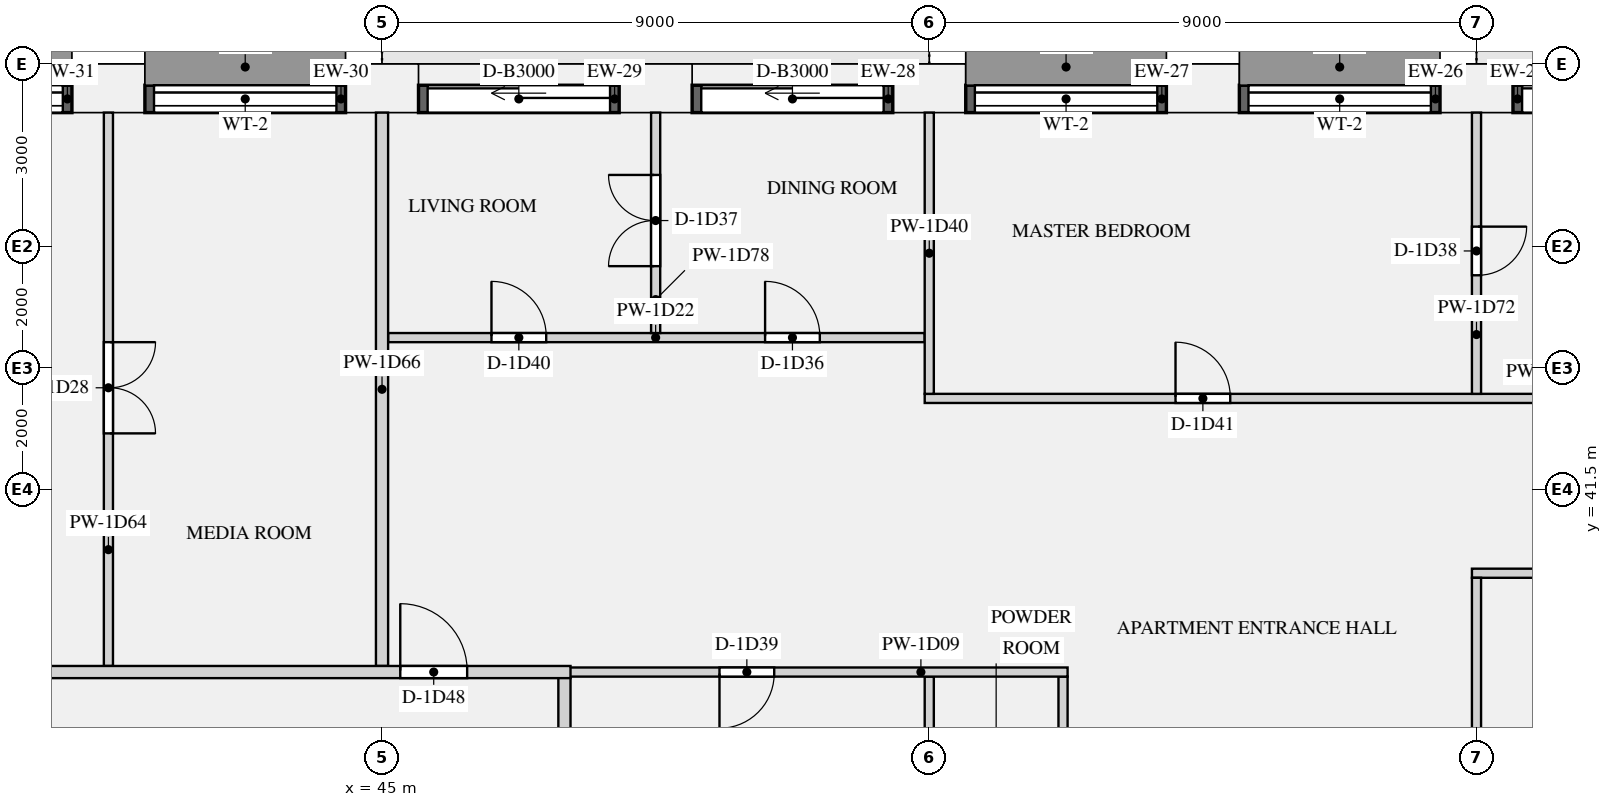
"""IFC4 building model, lengths in metres.
Left out: names, types, materials, properties, quantities, classifications, styles, units other than length and angle.
Written with IfcOpenShell. Run it as: python <this file> out.ifc"""

import sys

from ifc_helpers import new_model, si_unit, direction, frame, frame_2d, origin, origin_2d, place, context, subcontext, project, spatial, rectangle, extrude, element, fill, save


model = new_model("IFC4")
c1 = context("Model", 3, precision=1e-05, world=origin(), true_north=direction((0.0, 1.0)))
c2 = subcontext(c1, "Body", "Model", "MODEL_VIEW")
j1 = project(units=[si_unit("LENGTHUNIT", "METRE"), si_unit("PLANEANGLEUNIT", "RADIAN")], contexts=[c1])
p1 = place(None, origin())
s1 = spatial("IfcSite", under=j1, at=p1, CompositionType="ELEMENT")
p2 = place(p1, origin())
s2 = spatial("IfcBuilding", under=s1, at=p2, CompositionType="ELEMENT")
p3 = place(p2, frame((0.0, 0.0, 47.85)))
s3 = spatial("IfcBuildingStorey", under=s2, at=p3, CompositionType="ELEMENT", Elevation=47.85)
for number, where, z_axis, x_axis in (
    (1, (63.0, 48.1, 0.0), (0.0, 0.0, 1.0), (-1.0, 0.0, 0.0)),
    (2, (58.5, 48.1, 0.0), (0.0, 0.0, 1.0), (-1.0, 0.0, 0.0)),
    (3, (54.0, 48.1, 0.0), (0.0, 0.0, 1.0), (-1.0, 0.0, 0.0)),
    (4, (49.5, 48.1, 0.0), (0.0, 0.0, 1.0), (-1.0, 0.0, 0.0)),
    (5, (45.0, 48.1, 0.0), (0.0, 0.0, 1.0), (-1.0, 0.0, 0.0)),
    (6, (40.5, 48.1, 0.0), (0.0, 0.0, 1.0), (-1.0, 0.0, 0.0)),
):
    element("IfcColumn", number, at=place(p3, frame(where, z_axis=z_axis, x_axis=x_axis)), inside=s3, PredefinedType="USERDEFINED", context=c2, shape_type="SweptSolid", body=[
        extrude(rectangle(XDim=1.2, YDim=0.8, at=origin_2d()), origin(), (0.0, 0.0, 1.0), 3.15),
    ])
p4 = place(p3, frame((66.9, 47.925, 0.0), z_axis=(0.0, 0.0, 1.0), x_axis=(-1.0, 0.0, 0.0)))
e7 = element("IfcWall", 7, at=p4, inside=s3, PredefinedType="SOLIDWALL", context=c2, shape_type="SweptSolid", body=[
    extrude(rectangle(XDim=3.3, YDim=0.45, at=frame_2d((1.65, 0.0))), origin(), (0.0, 0.0, 1.0), 2.83),
])
p5 = place(p4, frame((0.15, 0.0, 0.0)))
e8 = element("IfcOpeningElement", 8, at=p5, cuts=e7, PredefinedType="OPENING", context=c2, shape_type="SweptSolid", body=[
    extrude(rectangle(XDim=3.0, YDim=2.3, at=frame_2d((1.5, 1.15))), frame((0.0, 0.235, 0.0), z_axis=(0.0, -1.0, 0.0), x_axis=(1.0, 0.0, 0.0)), (0.0, 0.0, 1.0), 0.47),
])
p6 = place(p3, frame((62.4, 47.925, 0.9), z_axis=(0.0, 0.0, 1.0), x_axis=(-1.0, 0.0, 0.0)))
e9 = element("IfcWall", 9, at=p6, inside=s3, PredefinedType="SOLIDWALL", context=c2, shape_type="SweptSolid", body=[
    extrude(rectangle(XDim=3.3, YDim=0.45, at=frame_2d((1.65, 0.0))), origin(), (0.0, 0.0, 1.0), 1.93),
])
p7 = place(p6, frame((0.15, 0.0, 0.15)))
e10 = element("IfcOpeningElement", 10, at=p7, cuts=e9, PredefinedType="OPENING", context=c2, shape_type="SweptSolid", body=[
    extrude(rectangle(XDim=3.0, YDim=1.5, at=frame_2d((1.5, 0.75))), frame((0.0, 0.235, 0.0), z_axis=(0.0, -1.0, 0.0), x_axis=(1.0, 0.0, 0.0)), (0.0, 0.0, 1.0), 0.47),
])
p8 = place(p3, frame((57.9, 47.925, 0.9), z_axis=(0.0, 0.0, 1.0), x_axis=(-1.0, 0.0, 0.0)))
e11 = element("IfcWall", 11, at=p8, inside=s3, PredefinedType="SOLIDWALL", context=c2, shape_type="SweptSolid", body=[
    extrude(rectangle(XDim=3.3, YDim=0.45, at=frame_2d((1.65, 0.0))), origin(), (0.0, 0.0, 1.0), 1.93),
])
p9 = place(p8, frame((0.15, 0.0, 0.15)))
e12 = element("IfcOpeningElement", 12, at=p9, cuts=e11, PredefinedType="OPENING", context=c2, shape_type="SweptSolid", body=[
    extrude(rectangle(XDim=3.0, YDim=1.5, at=frame_2d((1.5, 0.75))), frame((0.0, 0.235, 0.0), z_axis=(0.0, -1.0, 0.0), x_axis=(1.0, 0.0, 0.0)), (0.0, 0.0, 1.0), 0.47),
])
p10 = place(p3, frame((53.4, 47.925, 0.0), z_axis=(0.0, 0.0, 1.0), x_axis=(-1.0, 0.0, 0.0)))
e13 = element("IfcWall", 13, at=p10, inside=s3, PredefinedType="SOLIDWALL", context=c2, shape_type="SweptSolid", body=[
    extrude(rectangle(XDim=3.3, YDim=0.45, at=frame_2d((1.65, 0.0))), origin(), (0.0, 0.0, 1.0), 2.83),
])
p11 = place(p10, frame((0.15, 0.0, 0.0)))
e14 = element("IfcOpeningElement", 14, at=p11, cuts=e13, PredefinedType="OPENING", context=c2, shape_type="SweptSolid", body=[
    extrude(rectangle(XDim=3.0, YDim=2.3, at=frame_2d((1.5, 1.15))), frame((0.0, 0.235, 0.0), z_axis=(0.0, -1.0, 0.0), x_axis=(1.0, 0.0, 0.0)), (0.0, 0.0, 1.0), 0.47),
])
p12 = place(p3, frame((48.9, 47.925, 0.0), z_axis=(0.0, 0.0, 1.0), x_axis=(-1.0, 0.0, 0.0)))
e15 = element("IfcWall", 15, at=p12, inside=s3, PredefinedType="SOLIDWALL", context=c2, shape_type="SweptSolid", body=[
    extrude(rectangle(XDim=3.3, YDim=0.45, at=frame_2d((1.65, 0.0))), origin(), (0.0, 0.0, 1.0), 2.83),
])
p13 = place(p12, frame((0.15, 0.0, 0.0)))
e16 = element("IfcOpeningElement", 16, at=p13, cuts=e15, PredefinedType="OPENING", context=c2, shape_type="SweptSolid", body=[
    extrude(rectangle(XDim=3.0, YDim=2.3, at=frame_2d((1.5, 1.15))), frame((0.0, 0.235, 0.0), z_axis=(0.0, -1.0, 0.0), x_axis=(1.0, 0.0, 0.0)), (0.0, 0.0, 1.0), 0.47),
])
p14 = place(p3, frame((44.4, 47.925, 0.9), z_axis=(0.0, 0.0, 1.0), x_axis=(-1.0, 0.0, 0.0)))
e17 = element("IfcWall", 17, at=p14, inside=s3, PredefinedType="SOLIDWALL", context=c2, shape_type="SweptSolid", body=[
    extrude(rectangle(XDim=3.3, YDim=0.45, at=frame_2d((1.65, 0.0))), origin(), (0.0, 0.0, 1.0), 1.93),
])
p15 = place(p14, frame((0.15, 0.0, 0.15)))
e18 = element("IfcOpeningElement", 18, at=p15, cuts=e17, PredefinedType="OPENING", context=c2, shape_type="SweptSolid", body=[
    extrude(rectangle(XDim=3.0, YDim=1.5, at=frame_2d((1.5, 0.75))), frame((0.0, 0.235, 0.0), z_axis=(0.0, -1.0, 0.0), x_axis=(1.0, 0.0, 0.0)), (0.0, 0.0, 1.0), 0.47),
])
p16 = place(p3, frame((39.9, 47.925, 0.9), z_axis=(0.0, 0.0, 1.0), x_axis=(-1.0, 0.0, 0.0)))
e19 = element("IfcWall", 19, at=p16, inside=s3, PredefinedType="SOLIDWALL", context=c2, shape_type="SweptSolid", body=[
    extrude(rectangle(XDim=3.3, YDim=0.45, at=frame_2d((1.65, 0.0))), origin(), (0.0, 0.0, 1.0), 1.93),
])
p17 = place(p16, frame((0.15, 0.0, 0.15)))
e20 = element("IfcOpeningElement", 20, at=p17, cuts=e19, PredefinedType="OPENING", context=c2, shape_type="SweptSolid", body=[
    extrude(rectangle(XDim=3.0, YDim=1.5, at=frame_2d((1.5, 0.75))), frame((0.0, 0.235, 0.0), z_axis=(0.0, -1.0, 0.0), x_axis=(1.0, 0.0, 0.0)), (0.0, 0.0, 1.0), 0.47),
])
p18 = place(p3, frame((47.9, 38.5, 0.0), z_axis=(0.0, 0.0, 1.0), x_axis=(1.0, 0.0, 0.0)))
e21 = element("IfcWall", 21, at=p18, inside=s3, PredefinedType="PARTITIONING", context=c2, shape_type="SweptSolid", body=[
    extrude(rectangle(XDim=8.375, YDim=0.15, at=frame_2d((4.188, 0.0))), origin(), (0.0, 0.0, 1.0), 2.83),
])
p19 = place(p18, frame((2.65, 0.0, 0.0)))
e22 = element("IfcOpeningElement", 22, at=p19, cuts=e21, PredefinedType="OPENING", context=c2, shape_type="SweptSolid", body=[
    extrude(rectangle(XDim=0.9, YDim=2.1, at=frame_2d((0.45, 1.05))), frame((0.0, 0.085, 0.0), z_axis=(0.0, -1.0, 0.0), x_axis=(1.0, 0.0, 0.0)), (0.0, 0.0, 1.0), 0.17),
])
p20 = place(p3, frame((23.9, 38.5, 0.0), z_axis=(0.0, 0.0, 1.0), x_axis=(1.0, 0.0, 0.0)))
e23 = element("IfcWall", 23, at=p20, inside=s3, PredefinedType="PARTITIONING", context=c2, shape_type="SweptSolid", body=[
    extrude(rectangle(XDim=24.2, YDim=0.2, at=frame_2d((12.1, 0.0))), origin(), (0.0, 0.0, 1.0), 2.83),
])
p21 = place(p20, frame((3.55, 0.0, 0.0)))
e24 = element("IfcOpeningElement", 24, at=p21, cuts=e23, PredefinedType="OPENING", context=c2, shape_type="SweptSolid", body=[
    extrude(rectangle(XDim=1.1, YDim=2.1, at=frame_2d((0.55, 1.05))), frame((0.0, 0.11, 0.0), z_axis=(0.0, -1.0, 0.0), x_axis=(1.0, 0.0, 0.0)), (0.0, 0.0, 1.0), 0.22),
])
p22 = place(p20, frame((21.4, 0.0, 0.0)))
e25 = element("IfcOpeningElement", 25, at=p22, cuts=e23, PredefinedType="OPENING", context=c2, shape_type="SweptSolid", body=[
    extrude(rectangle(XDim=1.1, YDim=2.1, at=frame_2d((0.55, 1.05))), frame((0.0, 0.11, 0.0), z_axis=(0.0, -1.0, 0.0), x_axis=(1.0, 0.0, 0.0)), (0.0, 0.0, 1.0), 0.22),
])
p23 = place(p3, frame((45.1, 44.0, 0.0), z_axis=(0.0, 0.0, 1.0), x_axis=(1.0, 0.0, 0.0)))
e26 = element("IfcWall", 26, at=p23, inside=s3, PredefinedType="PARTITIONING", context=c2, shape_type="SweptSolid", body=[
    extrude(rectangle(XDim=8.825, YDim=0.15, at=frame_2d((4.413, 0.0))), origin(), (0.0, 0.0, 1.0), 2.83),
])
p24 = place(p23, frame((6.2, 0.0, 0.0)))
e27 = element("IfcOpeningElement", 27, at=p24, cuts=e26, PredefinedType="OPENING", context=c2, shape_type="SweptSolid", body=[
    extrude(rectangle(XDim=0.9, YDim=2.1, at=frame_2d((0.45, 1.05))), frame((0.0, 0.085, 0.0), z_axis=(0.0, -1.0, 0.0), x_axis=(1.0, 0.0, 0.0)), (0.0, 0.0, 1.0), 0.17),
])
p25 = place(p23, frame((1.7, 0.0, 0.0)))
e28 = element("IfcOpeningElement", 28, at=p25, cuts=e26, PredefinedType="OPENING", context=c2, shape_type="SweptSolid", body=[
    extrude(rectangle(XDim=0.9, YDim=2.1, at=frame_2d((0.45, 1.05))), frame((0.0, 0.085, 0.0), z_axis=(0.0, -1.0, 0.0), x_axis=(1.0, 0.0, 0.0)), (0.0, 0.0, 1.0), 0.17),
])
p26 = place(p3, frame((62.925, 40.125, 0.0), z_axis=(0.0, 0.0, 1.0), x_axis=(1.0, 0.0, 0.0)))
e29 = element("IfcWall", 29, at=p26, inside=s3, PredefinedType="PARTITIONING", context=c2, shape_type="SweptSolid", body=[
    extrude(rectangle(XDim=12.775, YDim=0.15, at=frame_2d((6.387, 0.0))), origin(), (0.0, 0.0, 1.0), 2.83),
])
p27 = place(p26, frame((4.125, 0.0, 0.0)))
e30 = element("IfcOpeningElement", 30, at=p27, cuts=e29, PredefinedType="OPENING", context=c2, shape_type="SweptSolid", body=[
    extrude(rectangle(XDim=0.9, YDim=2.1, at=frame_2d((0.45, 1.05))), frame((0.0, 0.085, 0.0), z_axis=(0.0, -1.0, 0.0), x_axis=(1.0, 0.0, 0.0)), (0.0, 0.0, 1.0), 0.17),
])
p28 = place(p3, frame((53.925, 43.0, 0.0), z_axis=(0.0, 0.0, 1.0), x_axis=(1.0, 0.0, 0.0)))
e31 = element("IfcWall", 31, at=p28, inside=s3, PredefinedType="PARTITIONING", context=c2, shape_type="SweptSolid", body=[
    extrude(rectangle(XDim=18.0, YDim=0.15, at=frame_2d((9.0, 0.0))), origin(), (0.0, 0.0, 1.0), 2.83),
])
p29 = place(p28, frame((15.375, 0.0, 0.0)))
e32 = element("IfcOpeningElement", 32, at=p29, cuts=e31, PredefinedType="OPENING", context=c2, shape_type="SweptSolid", body=[
    extrude(rectangle(XDim=0.9, YDim=2.1, at=frame_2d((0.45, 1.05))), frame((0.0, 0.085, 0.0), z_axis=(0.0, -1.0, 0.0), x_axis=(1.0, 0.0, 0.0)), (0.0, 0.0, 1.0), 0.17),
])
p30 = place(p28, frame((4.125, 0.0, 0.0)))
e33 = element("IfcOpeningElement", 33, at=p30, cuts=e31, PredefinedType="OPENING", context=c2, shape_type="SweptSolid", body=[
    extrude(rectangle(XDim=0.9, YDim=2.1, at=frame_2d((0.45, 1.05))), frame((0.0, 0.085, 0.0), z_axis=(0.0, -1.0, 0.0), x_axis=(1.0, 0.0, 0.0)), (0.0, 0.0, 1.0), 0.17),
])
p31 = place(p3, frame((54.0, 27.1, 0.0), z_axis=(0.0, 0.0, 1.0), x_axis=(0.0, 1.0, 0.0)))
e34 = element("IfcWall", 34, at=p31, inside=s3, PredefinedType="PARTITIONING", context=c2, shape_type="SweptSolid", body=[
    extrude(rectangle(XDim=11.325, YDim=0.15, at=frame_2d((5.663, 0.0))), origin(), (0.0, 0.0, 1.0), 2.83),
])
p32 = place(p31, frame((3.325, 0.0, 0.0)))
e35 = element("IfcOpeningElement", 35, at=p32, cuts=e34, PredefinedType="OPENING", context=c2, shape_type="SweptSolid", body=[
    extrude(rectangle(XDim=0.9, YDim=2.1, at=frame_2d((0.45, 1.05))), frame((0.0, 0.085, 0.0), z_axis=(0.0, -1.0, 0.0), x_axis=(1.0, 0.0, 0.0)), (0.0, 0.0, 1.0), 0.17),
])
p33 = place(p3, frame((54.0, 43.075, 0.0), z_axis=(0.0, 0.0, 1.0), x_axis=(0.0, 1.0, 0.0)))
e36 = element("IfcWall", 36, at=p33, inside=s3, PredefinedType="PARTITIONING", context=c2, shape_type="SweptSolid", body=[
    extrude(rectangle(XDim=4.625, YDim=0.15, at=frame_2d((2.312, 0.0))), origin(), (0.0, 0.0, 1.0), 2.83),
])
p34 = place(p3, frame((48.0, 27.1, 0.0), z_axis=(0.0, 0.0, 1.0), x_axis=(0.0, 1.0, 0.0)))
e37 = element("IfcWall", 37, at=p34, inside=s3, PredefinedType="PARTITIONING", context=c2, shape_type="SweptSolid", body=[
    extrude(rectangle(XDim=11.325, YDim=0.2, at=frame_2d((5.663, 0.0))), origin(), (0.0, 0.0, 1.0), 2.83),
])
p35 = place(p3, frame((40.5, 38.6, 0.0), z_axis=(0.0, 0.0, 1.0), x_axis=(0.0, 1.0, 0.0)))
e38 = element("IfcWall", 38, at=p35, inside=s3, PredefinedType="PARTITIONING", context=c2, shape_type="SweptSolid", body=[
    extrude(rectangle(XDim=9.1, YDim=0.15, at=frame_2d((4.55, 0.0))), origin(), (0.0, 0.0, 1.0), 2.83),
])
p36 = place(p35, frame((3.825, 0.0, 0.0)))
e39 = element("IfcOpeningElement", 39, at=p36, cuts=e38, PredefinedType="OPENING", context=c2, shape_type="SweptSolid", body=[
    extrude(rectangle(XDim=1.5, YDim=2.1, at=frame_2d((0.75, 1.05))), frame((0.0, 0.085, 0.0), z_axis=(0.0, -1.0, 0.0), x_axis=(1.0, 0.0, 0.0)), (0.0, 0.0, 1.0), 0.17),
])
p37 = place(p3, frame((45.0, 38.6, 0.0), z_axis=(0.0, 0.0, 1.0), x_axis=(0.0, 1.0, 0.0)))
e40 = element("IfcWall", 40, at=p37, inside=s3, PredefinedType="PARTITIONING", context=c2, shape_type="SweptSolid", body=[
    extrude(rectangle(XDim=9.1, YDim=0.2, at=frame_2d((4.55, 0.0))), origin(), (0.0, 0.0, 1.0), 2.83),
])
p38 = place(p3, frame((63.0, 32.475, 0.0), z_axis=(0.0, 0.0, 1.0), x_axis=(0.0, 1.0, 0.0)))
e41 = element("IfcWall", 41, at=p38, inside=s3, PredefinedType="PARTITIONING", context=c2, shape_type="SweptSolid", body=[
    extrude(rectangle(XDim=7.575, YDim=0.15, at=frame_2d((3.788, 0.0))), origin(), (0.0, 0.0, 1.0), 2.83),
])
p39 = place(p3, frame((63.0, 43.075, 0.0), z_axis=(0.0, 0.0, 1.0), x_axis=(0.0, 1.0, 0.0)))
e42 = element("IfcWall", 42, at=p39, inside=s3, PredefinedType="PARTITIONING", context=c2, shape_type="SweptSolid", body=[
    extrude(rectangle(XDim=4.625, YDim=0.15, at=frame_2d((2.312, 0.0))), origin(), (0.0, 0.0, 1.0), 2.83),
])
p40 = place(p39, frame((1.95, 0.0, 0.0)))
e43 = element("IfcOpeningElement", 43, at=p40, cuts=e42, PredefinedType="OPENING", context=c2, shape_type="SweptSolid", body=[
    extrude(rectangle(XDim=0.8, YDim=2.1, at=frame_2d((0.4, 1.05))), frame((0.0, 0.085, 0.0), z_axis=(0.0, -1.0, 0.0), x_axis=(1.0, 0.0, 0.0)), (0.0, 0.0, 1.0), 0.17),
])
p41 = place(p3, frame((56.2, 35.475, 0.0), z_axis=(0.0, 0.0, 1.0), x_axis=(0.0, 1.0, 0.0)))
e44 = element("IfcWall", 44, at=p41, inside=s3, PredefinedType="PARTITIONING", context=c2, shape_type="SweptSolid", body=[
    extrude(rectangle(XDim=2.95, YDim=0.15, at=frame_2d((1.475, 0.0))), origin(), (0.0, 0.0, 1.0), 2.83),
])
p42 = place(p41, frame((1.025, 0.0, 0.0)))
e45 = element("IfcOpeningElement", 45, at=p42, cuts=e44, PredefinedType="OPENING", context=c2, shape_type="SweptSolid", body=[
    extrude(rectangle(XDim=0.9, YDim=2.1, at=frame_2d((0.45, 1.05))), frame((0.0, 0.085, 0.0), z_axis=(0.0, -1.0, 0.0), x_axis=(1.0, 0.0, 0.0)), (0.0, 0.0, 1.0), 0.17),
])
p43 = place(p3, frame((49.5, 44.075, 0.0), z_axis=(0.0, 0.0, 1.0), x_axis=(0.0, 1.0, 0.0)))
e46 = element("IfcWall", 46, at=p43, inside=s3, PredefinedType="PARTITIONING", context=c2, shape_type="SweptSolid", body=[
    extrude(rectangle(XDim=3.625, YDim=0.15, at=frame_2d((1.812, 0.0))), origin(), (0.0, 0.0, 1.0), 2.83),
])
p44 = place(p43, frame((1.1, 0.0, 0.0)))
e47 = element("IfcOpeningElement", 47, at=p44, cuts=e46, PredefinedType="OPENING", context=c2, shape_type="SweptSolid", body=[
    extrude(rectangle(XDim=1.5, YDim=2.1, at=frame_2d((0.75, 1.05))), frame((0.0, 0.085, 0.0), z_axis=(0.0, -1.0, 0.0), x_axis=(1.0, 0.0, 0.0)), (0.0, 0.0, 1.0), 0.17),
])
p45 = place(p5, origin())
e48 = element("IfcDoor", 48, at=p45, inside=s3, OperationType="SLIDING_TO_LEFT", PredefinedType="DOOR", context=c2, shape_type="SweptSolid", body=[
    extrude(rectangle(XDim=3.0, YDim=2.3, at=frame_2d((1.5, 1.15))), frame((0.0, -0.07, 0.0), z_axis=(0.0, -1.0, 0.0), x_axis=(1.0, 0.0, 0.0)), (0.0, 0.0, 1.0), 0.05),
])
fill(e8, e48)
p46 = place(p7, origin())
e49 = element("IfcWindow", 49, at=p46, inside=s3, PartitioningType="SINGLE_PANEL", PredefinedType="WINDOW", context=c2, shape_type="SweptSolid", body=[
    extrude(rectangle(XDim=3.0, YDim=1.5, at=frame_2d((1.5, 0.75))), frame((0.0, -0.065, 0.0), z_axis=(0.0, -1.0, 0.0), x_axis=(1.0, 0.0, 0.0)), (0.0, 0.0, 1.0), 0.06),
])
fill(e10, e49)
p47 = place(p9, origin())
e50 = element("IfcWindow", 50, at=p47, inside=s3, PartitioningType="SINGLE_PANEL", PredefinedType="WINDOW", context=c2, shape_type="SweptSolid", body=[
    extrude(rectangle(XDim=3.0, YDim=1.5, at=frame_2d((1.5, 0.75))), frame((0.0, -0.065, 0.0), z_axis=(0.0, -1.0, 0.0), x_axis=(1.0, 0.0, 0.0)), (0.0, 0.0, 1.0), 0.06),
])
fill(e12, e50)
p48 = place(p11, origin())
e51 = element("IfcDoor", 51, at=p48, inside=s3, OperationType="SLIDING_TO_LEFT", PredefinedType="DOOR", context=c2, shape_type="SweptSolid", body=[
    extrude(rectangle(XDim=3.0, YDim=2.3, at=frame_2d((1.5, 1.15))), frame((0.0, -0.07, 0.0), z_axis=(0.0, -1.0, 0.0), x_axis=(1.0, 0.0, 0.0)), (0.0, 0.0, 1.0), 0.05),
])
fill(e14, e51)
p49 = place(p13, origin())
e52 = element("IfcDoor", 52, at=p49, inside=s3, OperationType="SLIDING_TO_LEFT", PredefinedType="DOOR", context=c2, shape_type="SweptSolid", body=[
    extrude(rectangle(XDim=3.0, YDim=2.3, at=frame_2d((1.5, 1.15))), frame((0.0, -0.07, 0.0), z_axis=(0.0, -1.0, 0.0), x_axis=(1.0, 0.0, 0.0)), (0.0, 0.0, 1.0), 0.05),
])
fill(e16, e52)
p50 = place(p15, origin())
e53 = element("IfcWindow", 53, at=p50, inside=s3, PartitioningType="SINGLE_PANEL", PredefinedType="WINDOW", context=c2, shape_type="SweptSolid", body=[
    extrude(rectangle(XDim=3.0, YDim=1.5, at=frame_2d((1.5, 0.75))), frame((0.0, -0.065, 0.0), z_axis=(0.0, -1.0, 0.0), x_axis=(1.0, 0.0, 0.0)), (0.0, 0.0, 1.0), 0.06),
])
fill(e18, e53)
p51 = place(p17, origin())
e54 = element("IfcWindow", 54, at=p51, inside=s3, PartitioningType="SINGLE_PANEL", PredefinedType="WINDOW", context=c2, shape_type="SweptSolid", body=[
    extrude(rectangle(XDim=3.0, YDim=1.5, at=frame_2d((1.5, 0.75))), frame((0.0, -0.065, 0.0), z_axis=(0.0, -1.0, 0.0), x_axis=(1.0, 0.0, 0.0)), (0.0, 0.0, 1.0), 0.06),
])
fill(e20, e54)
p52 = place(p36, frame((1.5, 0.0, 0.0), z_axis=(0.0, 0.0, 1.0), x_axis=(-1.0, 0.0, 0.0)))
e55 = element("IfcDoor", 55, at=p52, inside=s3, OperationType="DOUBLE_DOOR_SINGLE_SWING", PredefinedType="DOOR", context=c2, shape_type="SweptSolid", body=[
    extrude(rectangle(XDim=1.5, YDim=2.1, at=frame_2d((0.75, 1.05))), frame((0.0, 0.025, 0.0), z_axis=(0.0, -1.0, 0.0), x_axis=(1.0, 0.0, 0.0)), (0.0, 0.0, 1.0), 0.05),
])
fill(e39, e55)
p53 = place(p24, origin())
e56 = element("IfcDoor", 56, at=p53, inside=s3, OperationType="SINGLE_SWING_LEFT", PredefinedType="DOOR", context=c2, shape_type="SweptSolid", body=[
    extrude(rectangle(XDim=0.9, YDim=2.1, at=frame_2d((0.45, 1.05))), frame((0.0, 0.025, 0.0), z_axis=(0.0, -1.0, 0.0), x_axis=(1.0, 0.0, 0.0)), (0.0, 0.0, 1.0), 0.05),
])
fill(e27, e56)
p54 = place(p44, origin())
e57 = element("IfcDoor", 57, at=p54, inside=s3, OperationType="DOUBLE_DOOR_SINGLE_SWING", PredefinedType="DOOR", context=c2, shape_type="SweptSolid", body=[
    extrude(rectangle(XDim=1.5, YDim=2.1, at=frame_2d((0.75, 1.05))), frame((0.0, 0.025, 0.0), z_axis=(0.0, -1.0, 0.0), x_axis=(1.0, 0.0, 0.0)), (0.0, 0.0, 1.0), 0.05),
])
fill(e47, e57)
p55 = place(p40, frame((0.8, 0.0, 0.0), z_axis=(0.0, 0.0, 1.0), x_axis=(-1.0, 0.0, 0.0)))
e58 = element("IfcDoor", 58, at=p55, inside=s3, OperationType="SINGLE_SWING_LEFT", PredefinedType="DOOR", context=c2, shape_type="SweptSolid", body=[
    extrude(rectangle(XDim=0.8, YDim=2.1, at=frame_2d((0.4, 1.05))), frame((0.0, 0.025, 0.0), z_axis=(0.0, -1.0, 0.0), x_axis=(1.0, 0.0, 0.0)), (0.0, 0.0, 1.0), 0.05),
])
fill(e43, e58)
p56 = place(p19, frame((0.9, 0.0, 0.0), z_axis=(0.0, 0.0, 1.0), x_axis=(-1.0, 0.0, 0.0)))
e59 = element("IfcDoor", 59, at=p56, inside=s3, OperationType="SINGLE_SWING_RIGHT", PredefinedType="DOOR", context=c2, shape_type="SweptSolid", body=[
    extrude(rectangle(XDim=0.9, YDim=2.1, at=frame_2d((0.45, 1.05))), frame((0.0, 0.025, 0.0), z_axis=(0.0, -1.0, 0.0), x_axis=(1.0, 0.0, 0.0)), (0.0, 0.0, 1.0), 0.05),
])
fill(e22, e59)
p57 = place(p25, origin())
e60 = element("IfcDoor", 60, at=p57, inside=s3, OperationType="SINGLE_SWING_LEFT", PredefinedType="DOOR", context=c2, shape_type="SweptSolid", body=[
    extrude(rectangle(XDim=0.9, YDim=2.1, at=frame_2d((0.45, 1.05))), frame((0.0, 0.025, 0.0), z_axis=(0.0, -1.0, 0.0), x_axis=(1.0, 0.0, 0.0)), (0.0, 0.0, 1.0), 0.05),
])
fill(e28, e60)
p58 = place(p30, origin())
e61 = element("IfcDoor", 61, at=p58, inside=s3, OperationType="SINGLE_SWING_LEFT", PredefinedType="DOOR", context=c2, shape_type="SweptSolid", body=[
    extrude(rectangle(XDim=0.9, YDim=2.1, at=frame_2d((0.45, 1.05))), frame((0.0, 0.025, 0.0), z_axis=(0.0, -1.0, 0.0), x_axis=(1.0, 0.0, 0.0)), (0.0, 0.0, 1.0), 0.05),
])
fill(e33, e61)
p59 = place(p22, origin())
e62 = element("IfcDoor", 62, at=p59, inside=s3, OperationType="SINGLE_SWING_LEFT", PredefinedType="DOOR", context=c2, shape_type="SweptSolid", body=[
    extrude(rectangle(XDim=1.1, YDim=2.1, at=frame_2d((0.55, 1.05))), frame((0.0, 0.025, 0.0), z_axis=(0.0, -1.0, 0.0), x_axis=(1.0, 0.0, 0.0)), (0.0, 0.0, 1.0), 0.05),
])
fill(e25, e62)
save(model, sys.argv[1])
